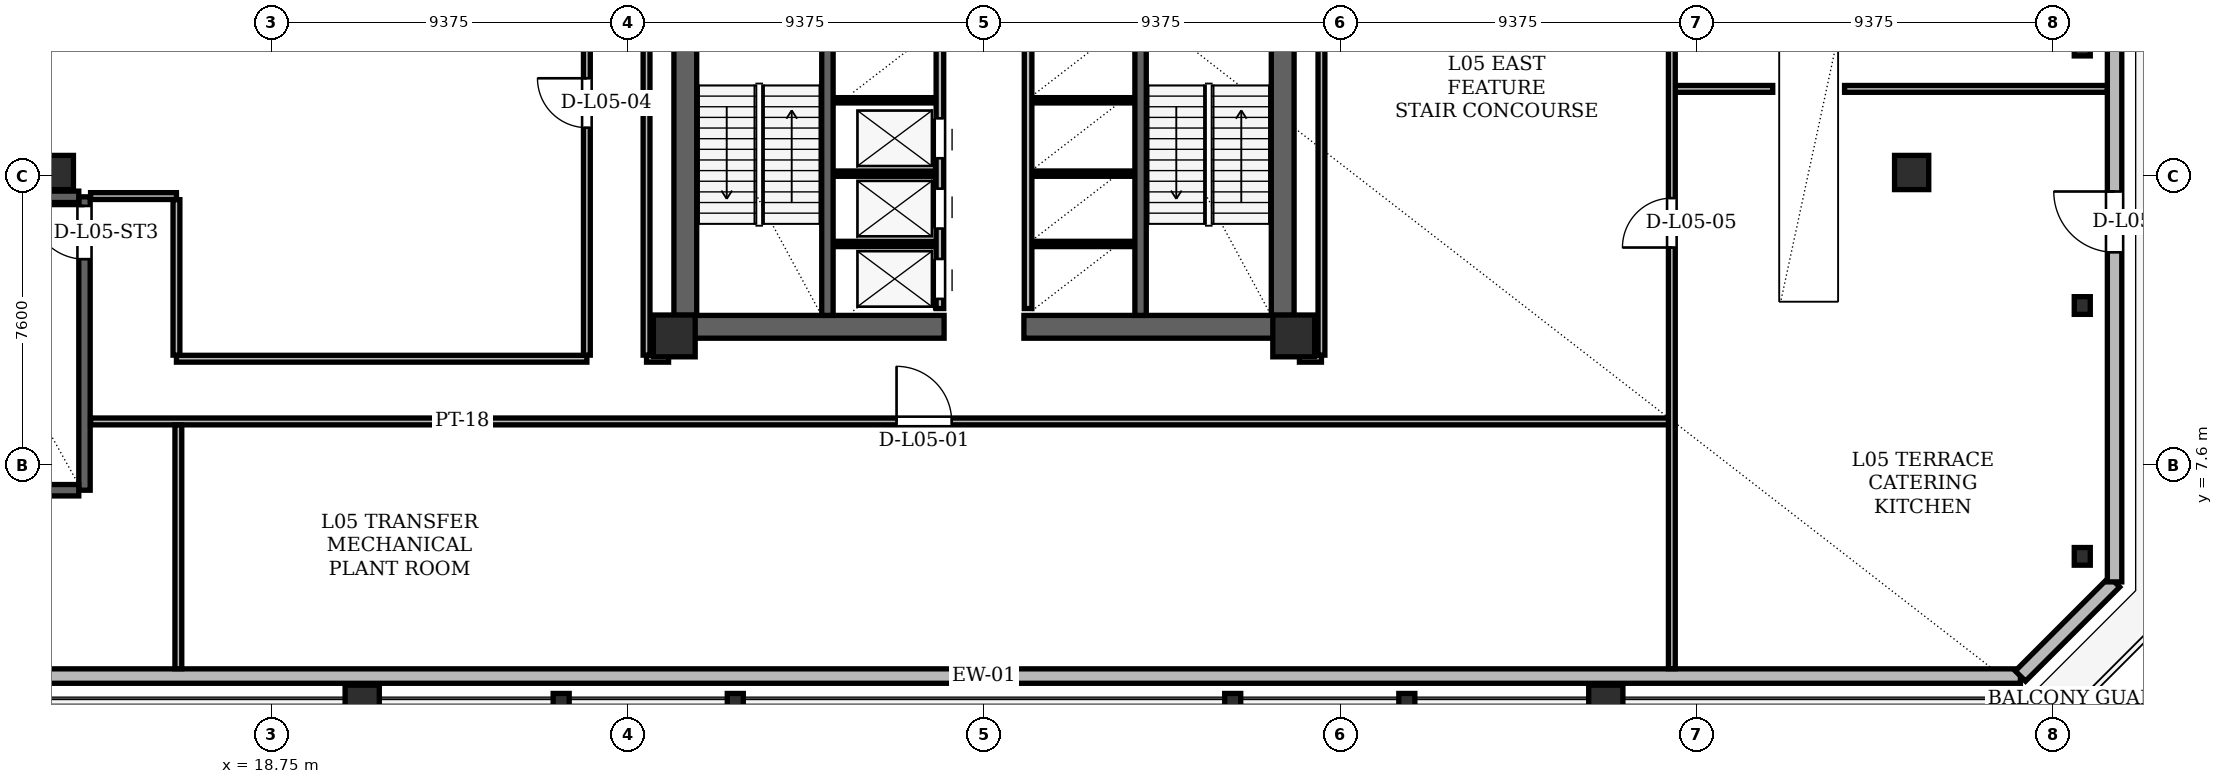
"""IFC4 building model, lengths in metres.
Left out: names, types, materials, properties, quantities, classifications, styles, units other than length and angle.
Written with IfcOpenShell. Run it as: python <this file> out.ifc"""

import sys

from ifc_helpers import new_model, si_unit, direction, frame, frame_2d, origin, origin_2d, place, context, subcontext, project, spatial, rectangle, hollow_rectangle, i_section, extrude, element, fill, save


model = new_model("IFC4")
c1 = context("Model", 3, precision=1e-05, world=origin(), true_north=direction((0.0, 1.0)))
c2 = subcontext(c1, "Body", "Model", "MODEL_VIEW")
j1 = project(units=[si_unit("LENGTHUNIT", "METRE"), si_unit("PLANEANGLEUNIT", "RADIAN")], contexts=[c1])
p1 = place(None, origin())
s1 = spatial("IfcSite", under=j1, at=p1, CompositionType="ELEMENT")
p2 = place(p1, origin())
s2 = spatial("IfcBuilding", under=s1, at=p2, CompositionType="ELEMENT")
p3 = place(p2, frame((0.0, 0.0, 22.5)))
s3 = spatial("IfcBuildingStorey", under=s2, at=p3, CompositionType="ELEMENT", Elevation=22.5)
for number, where, z_axis, x_axis in (
    (1, (29.35, 11.0, 0.0), (0.0, 0.0, 1.0), (1.0, 0.0, 0.0)),
    (2, (45.65, 11.0, 0.0), (0.0, 0.0, 1.0), (1.0, 0.0, 0.0)),
):
    element("IfcColumn", number, at=place(p3, frame(where, z_axis=z_axis, x_axis=x_axis)), inside=s3, PredefinedType="COLUMN", context=c2, shape_type="SweptSolid", body=[
        extrude(hollow_rectangle(XDim=1.1, YDim=1.1, WallThickness=0.09, at=origin_2d()), origin(), (0.0, 0.0, 1.0), 4.8),
    ])
for number, where, z_axis, x_axis in (
    (3, (13.09, 15.3, 0.004), (0.0, 0.0, 1.0), (1.0, 0.0, 0.0)),
    (4, (21.138, 1.36, 0.004), (0.0, 0.0, 1.0), (1.0, 0.0, 0.0)),
    (5, (53.862, 1.36, 0.004), (0.0, 0.0, 1.0), (1.0, 0.0, 0.0)),
    (6, (61.91, 15.3, 0.004), (0.0, 0.0, 1.0), (1.0, 0.0, 0.0)),
):
    element("IfcColumn", number, at=place(p3, frame(where, z_axis=z_axis, x_axis=x_axis)), inside=s3, PredefinedType="COLUMN", context=c2, shape_type="SweptSolid", body=[
        extrude(hollow_rectangle(XDim=0.9, YDim=0.9, WallThickness=0.075, at=origin_2d()), origin(), (0.0, 0.0, 1.0), 4.786),
    ])
for number, where, z_axis, x_axis in (
    (7, (26.374, 1.36, 0.004), (0.0, 0.0, 1.0), (1.0, 0.0, 0.0)),
    (8, (30.955, 1.36, 0.004), (0.0, 0.0, 1.0), (1.0, 0.0, 0.0)),
    (9, (44.045, 1.36, 0.004), (0.0, 0.0, 1.0), (1.0, 0.0, 0.0)),
    (10, (48.626, 1.36, 0.004), (0.0, 0.0, 1.0), (1.0, 0.0, 0.0)),
):
    element("IfcColumn", number, at=place(p3, frame(where, z_axis=z_axis, x_axis=x_axis)), inside=s3, PredefinedType="COLUMN", context=c2, shape_type="SweptSolid", body=[
        extrude(i_section(OverallWidth=0.422, OverallDepth=0.465, WebThickness=0.045, FlangeThickness=0.072, at=origin_2d()), origin(), (0.0, 0.0, 1.0), 4.791),
    ])
for number, where, z_axis, x_axis in (
    (11, (66.4, 5.2, 0.0), (0.0, 0.0, 1.0), (1.0, 0.0, 0.0)),
    (12, (66.4, 11.8, 0.0), (0.0, 0.0, 1.0), (1.0, 0.0, 0.0)),
    (13, (66.4, 18.6, 0.0), (0.0, 0.0, 1.0), (1.0, 0.0, 0.0)),
):
    element("IfcColumn", number, at=place(p3, frame(where, z_axis=z_axis, x_axis=x_axis)), inside=s3, PredefinedType="COLUMN", context=c2, shape_type="SweptSolid", body=[
        extrude(i_section(OverallWidth=0.422, OverallDepth=0.465, WebThickness=0.045, FlangeThickness=0.072, at=origin_2d()), origin(), (0.0, 0.0, 1.0), 4.8),
    ])
for number, where, z_axis, x_axis in (
    (14, (29.64, 11.0, 0.0), (0.0, 0.0, 1.0), (0.0, 1.0, 0.0)),
    (15, (45.36, 11.0, 0.0), (0.0, 0.0, 1.0), (0.0, 1.0, 0.0)),
):
    element("IfcWall", number, at=place(p3, frame(where, z_axis=z_axis, x_axis=x_axis)), inside=s3, PredefinedType="SHEAR", context=c2, shape_type="SweptSolid", body=[
        extrude(rectangle(XDim=13.3, YDim=0.6, at=frame_2d((6.65, 0.0))), origin(), (0.0, 0.0, 1.0), 4.56),
    ])
for number, where, z_axis, x_axis in (
    (16, (29.35, 11.24, 0.0), (0.0, 0.0, 1.0), (1.0, 0.0, 0.0)),
    (17, (38.55, 11.24, 0.0), (0.0, 0.0, 1.0), (1.0, 0.0, 0.0)),
):
    element("IfcWall", number, at=place(p3, frame(where, z_axis=z_axis, x_axis=x_axis)), inside=s3, PredefinedType="SHEAR", context=c2, shape_type="SweptSolid", body=[
        extrude(rectangle(XDim=7.1, YDim=0.6, at=frame_2d((3.55, 0.0))), origin(), (0.0, 0.0, 1.0), 4.56),
    ])
for number, where, z_axis, x_axis in (
    (18, (33.38, 11.54, 0.0), (0.0, 0.0, 1.0), (0.0, 1.0, 0.0)),
    (19, (41.62, 11.54, 0.0), (0.0, 0.0, 1.0), (0.0, 1.0, 0.0)),
):
    element("IfcWall", number, at=place(p3, frame(where, z_axis=z_axis, x_axis=x_axis)), inside=s3, PredefinedType="SHEAR", context=c2, shape_type="SweptSolid", body=[
        extrude(rectangle(XDim=7.62, YDim=0.3, at=frame_2d((3.81, 0.0))), origin(), (0.0, 0.0, 1.0), 4.56),
    ])
p4 = place(p3, frame((13.83, 6.94, 0.0), z_axis=(0.0, 0.0, 1.0), x_axis=(0.0, 1.0, 0.0)))
e20 = element("IfcWall", 20, at=p4, inside=s3, PredefinedType="SHEAR", context=c2, shape_type="SweptSolid", body=[
    extrude(rectangle(XDim=7.72, YDim=0.3, at=frame_2d((3.86, 0.0))), origin(), (0.0, 0.0, 1.0), 4.56),
])
p5 = place(p4, frame((6.08, 0.0, 0.0)))
e21 = element("IfcOpeningElement", 21, at=p5, cuts=e20, PredefinedType="OPENING", context=c2, shape_type="SweptSolid", body=[
    extrude(rectangle(XDim=1.4, YDim=2.2, at=frame_2d((0.7, 1.1))), frame((0.0, 0.15, 0.0), z_axis=(0.0, -1.0, 0.0), x_axis=(1.0, 0.0, 0.0)), (0.0, 0.0, 1.0), 0.3),
])
for number, where, z_axis, x_axis in (
    (22, (10.39, 6.94, 0.0), (0.0, 0.0, 1.0), (1.0, 0.0, 0.0)),
    (23, (10.39, 14.66, 0.0), (0.0, 0.0, 1.0), (1.0, 0.0, 0.0)),
):
    element("IfcWall", number, at=place(p3, frame(where, z_axis=z_axis, x_axis=x_axis)), inside=s3, PredefinedType="SHEAR", context=c2, shape_type="SweptSolid", body=[
        extrude(rectangle(XDim=3.29, YDim=0.3, at=frame_2d((1.645, 0.0))), origin(), (0.0, 0.0, 1.0), 4.56),
    ])
p6 = place(p3, frame((10.228, 2.05, 0.0), z_axis=(0.0, 0.0, 1.0), x_axis=(1.0, 0.0, 0.0)))
e24 = element("IfcWall", 24, at=p6, inside=s3, PredefinedType="SOLIDWALL", context=c2, shape_type="SweptSolid", body=[
    extrude(rectangle(XDim=54.544, YDim=0.38, at=frame_2d((27.272, 0.0))), origin(), (0.0, 0.0, 1.0), 3.35),
])
p7 = place(p3, frame((64.772, 2.05, 0.0), z_axis=(0.0, 0.0, 1.0), x_axis=(0.707106781187, 0.707106781187, 0.0)))
e25 = element("IfcWall", 25, at=p7, inside=s3, PredefinedType="SOLIDWALL", context=c2, shape_type="SweptSolid", body=[
    extrude(rectangle(XDim=3.504, YDim=0.38, at=frame_2d((1.752, 0.0))), origin(), (0.0, 0.0, 1.0), 4.56),
])
p8 = place(p3, frame((67.25, 4.528, 0.0), z_axis=(0.0, 0.0, 1.0), x_axis=(0.0, 1.0, 0.0)))
e26 = element("IfcWall", 26, at=p8, inside=s3, PredefinedType="SOLIDWALL", context=c2, shape_type="SweptSolid", body=[
    extrude(rectangle(XDim=36.544, YDim=0.38, at=frame_2d((18.272, 0.0))), origin(), (0.0, 0.0, 1.0), 4.56),
])
p9 = place(p8, frame((8.672, 0.0, 0.0)))
e27 = element("IfcOpeningElement", 27, at=p9, cuts=e26, PredefinedType="OPENING", context=c2, shape_type="SweptSolid", body=[
    extrude(rectangle(XDim=1.6, YDim=2.2, at=frame_2d((0.8, 1.1))), frame((0.0, 0.19, 0.0), z_axis=(0.0, -1.0, 0.0), x_axis=(1.0, 0.0, 0.0)), (0.0, 0.0, 1.0), 0.38),
])
p10 = place(p3, frame((36.34, 11.72, 0.0), z_axis=(0.0, 0.0, 1.0), x_axis=(0.0, 1.0, 0.0)))
e28 = element("IfcWall", 28, at=p10, inside=s3, PredefinedType="PARTITIONING", context=c2, shape_type="SweptSolid", body=[
    extrude(rectangle(XDim=7.6, YDim=0.2, at=frame_2d((3.8, 0.0))), origin(), (0.0, 0.0, 1.0), 4.56),
])
p11 = place(p10, frame((0.255, 0.0, 0.0)))
e29 = element("IfcOpeningElement", 29, at=p11, cuts=e28, PredefinedType="OPENING", context=c2, shape_type="SweptSolid", body=[
    extrude(rectangle(XDim=1.05, YDim=2.15, at=frame_2d((0.525, 1.075))), frame((0.0, 0.1, 0.0), z_axis=(0.0, -1.0, 0.0), x_axis=(1.0, 0.0, 0.0)), (0.0, 0.0, 1.0), 0.2),
])
p12 = place(p10, frame((2.105, 0.0, 0.0)))
e30 = element("IfcOpeningElement", 30, at=p12, cuts=e28, PredefinedType="OPENING", context=c2, shape_type="SweptSolid", body=[
    extrude(rectangle(XDim=1.05, YDim=2.15, at=frame_2d((0.525, 1.075))), frame((0.0, 0.1, 0.0), z_axis=(0.0, -1.0, 0.0), x_axis=(1.0, 0.0, 0.0)), (0.0, 0.0, 1.0), 0.2),
])
p13 = place(p10, frame((3.955, 0.0, 0.0)))
e31 = element("IfcOpeningElement", 31, at=p13, cuts=e28, PredefinedType="OPENING", context=c2, shape_type="SweptSolid", body=[
    extrude(rectangle(XDim=1.05, YDim=2.15, at=frame_2d((0.525, 1.075))), frame((0.0, 0.1, 0.0), z_axis=(0.0, -1.0, 0.0), x_axis=(1.0, 0.0, 0.0)), (0.0, 0.0, 1.0), 0.2),
])
for number, where, z_axis, x_axis in (
    (32, (33.56, 13.42, 0.0), (0.0, 0.0, 1.0), (1.0, 0.0, 0.0)),
    (33, (33.56, 15.27, 0.0), (0.0, 0.0, 1.0), (1.0, 0.0, 0.0)),
    (34, (33.56, 17.2, 0.0), (0.0, 0.0, 1.0), (1.0, 0.0, 0.0)),
):
    element("IfcWall", number, at=place(p3, frame(where, z_axis=z_axis, x_axis=x_axis)), inside=s3, PredefinedType="PARTITIONING", context=c2, shape_type="SweptSolid", body=[
        extrude(rectangle(XDim=2.66, YDim=0.14, at=frame_2d((1.33, 0.0))), origin(), (0.0, 0.0, 1.0), 4.56),
    ])
p14 = place(p3, frame((38.66, 11.72, 0.0), z_axis=(0.0, 0.0, 1.0), x_axis=(0.0, 1.0, 0.0)))
e35 = element("IfcWall", 35, at=p14, inside=s3, PredefinedType="PARTITIONING", context=c2, shape_type="SweptSolid", body=[
    extrude(rectangle(XDim=9.1, YDim=0.2, at=frame_2d((4.55, 0.0))), origin(), (0.0, 0.0, 1.0), 4.56),
])
for number, where, z_axis, x_axis in (
    (36, (38.78, 13.42, 0.0), (0.0, 0.0, 1.0), (1.0, 0.0, 0.0)),
    (37, (38.78, 15.27, 0.0), (0.0, 0.0, 1.0), (1.0, 0.0, 0.0)),
    (38, (38.78, 17.2, 0.0), (0.0, 0.0, 1.0), (1.0, 0.0, 0.0)),
):
    element("IfcWall", number, at=place(p3, frame(where, z_axis=z_axis, x_axis=x_axis)), inside=s3, PredefinedType="PARTITIONING", context=c2, shape_type="SweptSolid", body=[
        extrude(rectangle(XDim=2.66, YDim=0.14, at=frame_2d((1.33, 0.0))), origin(), (0.0, 0.0, 1.0), 4.56),
    ])
p15 = place(p3, frame((13.99, 8.75, 0.0), z_axis=(0.0, 0.0, 1.0), x_axis=(1.0, 0.0, 0.0)))
e39 = element("IfcWall", 39, at=p15, inside=s3, PredefinedType="PARTITIONING", context=c2, shape_type="SweptSolid", body=[
    extrude(rectangle(XDim=41.61, YDim=0.18, at=frame_2d((20.805, 0.0))), origin(), (0.0, 0.0, 1.0), 3.35),
])
p16 = place(p15, frame((21.209, 0.0, 0.0)))
e40 = element("IfcOpeningElement", 40, at=p16, cuts=e39, PredefinedType="OPENING", context=c2, shape_type="SweptSolid", body=[
    extrude(rectangle(XDim=1.45, YDim=2.25, at=frame_2d((0.725, 1.125))), frame((0.0, 0.09, 0.0), z_axis=(0.0, -1.0, 0.0), x_axis=(1.0, 0.0, 0.0)), (0.0, 0.0, 1.0), 0.18),
])
p17 = place(p3, frame((16.25, 10.4, 0.0), z_axis=(0.0, 0.0, 1.0), x_axis=(1.0, 0.0, 0.0)))
e41 = element("IfcWall", 41, at=p17, inside=s3, PredefinedType="PARTITIONING", context=c2, shape_type="SweptSolid", body=[
    extrude(rectangle(XDim=10.8, YDim=0.18, at=frame_2d((5.4, 0.0))), origin(), (0.0, 0.0, 1.0), 4.56),
])
for number, where, z_axis, x_axis in (
    (42, (28.62, 10.4, 0.0), (0.0, 0.0, 1.0), (1.0, 0.0, 0.0)),
    (43, (45.8, 10.4, 0.0), (0.0, 0.0, 1.0), (1.0, 0.0, 0.0)),
):
    element("IfcWall", number, at=place(p3, frame(where, z_axis=z_axis, x_axis=x_axis)), inside=s3, PredefinedType="PARTITIONING", context=c2, shape_type="SweptSolid", body=[
        extrude(rectangle(XDim=0.58, YDim=0.18, at=frame_2d((0.29, 0.0))), origin(), (0.0, 0.0, 1.0), 3.623),
    ])
p18 = place(p3, frame((13.99, 14.68, 0.0), z_axis=(0.0, 0.0, 1.0), x_axis=(1.0, 0.0, 0.0)))
e44 = element("IfcWall", 44, at=p18, inside=s3, PredefinedType="PARTITIONING", context=c2, shape_type="SweptSolid", body=[
    extrude(rectangle(XDim=2.26, YDim=0.18, at=frame_2d((1.13, 0.0))), origin(), (0.0, 0.0, 1.0), 3.623),
])
p19 = place(p3, frame((55.6, 17.5, 0.0), z_axis=(0.0, 0.0, 1.0), x_axis=(1.0, 0.0, 0.0)))
e45 = element("IfcWall", 45, at=p19, inside=s3, PredefinedType="PARTITIONING", context=c2, shape_type="SweptSolid", body=[
    extrude(rectangle(XDim=2.655, YDim=0.18, at=frame_2d((1.327, 0.0))), origin(), (0.0, 0.0, 1.0), 4.56),
])
p20 = place(p3, frame((60.145, 17.5, 0.0), z_axis=(0.0, 0.0, 1.0), x_axis=(1.0, 0.0, 0.0)))
e46 = element("IfcWall", 46, at=p20, inside=s3, PredefinedType="PARTITIONING", context=c2, shape_type="SweptSolid", body=[
    extrude(rectangle(XDim=6.911, YDim=0.18, at=frame_2d((3.456, 0.0))), origin(), (0.0, 0.0, 1.0), 3.35),
])
p21 = place(p3, frame((16.25, 10.494, 0.0), z_axis=(0.0, 0.0, 1.0), x_axis=(0.0, 1.0, 0.0)))
e47 = element("IfcWall", 47, at=p21, inside=s3, PredefinedType="PARTITIONING", context=c2, shape_type="SweptSolid", body=[
    extrude(rectangle(XDim=4.092, YDim=0.18, at=frame_2d((2.046, 0.0))), origin(), (0.0, 0.0, 1.0), 3.35),
])
p22 = place(p3, frame((16.3, 2.244, 0.0), z_axis=(0.0, 0.0, 1.0), x_axis=(0.0, 1.0, 0.0)))
e48 = element("IfcWall", 48, at=p22, inside=s3, PredefinedType="PARTITIONING", context=c2, shape_type="SweptSolid", body=[
    extrude(rectangle(XDim=6.412, YDim=0.18, at=frame_2d((3.206, 0.0))), origin(), (0.0, 0.0, 1.0), 4.56),
])
p23 = place(p3, frame((27.05, 10.494, 0.0), z_axis=(0.0, 0.0, 1.0), x_axis=(0.0, 1.0, 0.0)))
e49 = element("IfcWall", 49, at=p23, inside=s3, PredefinedType="PARTITIONING", context=c2, shape_type="SweptSolid", body=[
    extrude(rectangle(XDim=28.386, YDim=0.18, at=frame_2d((14.193, 0.0))), origin(), (0.0, 0.0, 1.0), 3.35),
])
p24 = place(p23, frame((5.985, 0.0, 0.0)))
e50 = element("IfcOpeningElement", 50, at=p24, cuts=e49, PredefinedType="OPENING", context=c2, shape_type="SweptSolid", body=[
    extrude(rectangle(XDim=1.3, YDim=2.2, at=frame_2d((0.65, 1.1))), frame((0.0, 0.09, 0.0), z_axis=(0.0, -1.0, 0.0), x_axis=(1.0, 0.0, 0.0)), (0.0, 0.0, 1.0), 0.18),
])
p25 = place(p3, frame((28.62, 10.494, 0.0), z_axis=(0.0, 0.0, 1.0), x_axis=(0.0, 1.0, 0.0)))
e51 = element("IfcWall", 51, at=p25, inside=s3, PredefinedType="PARTITIONING", context=c2, shape_type="SweptSolid", body=[
    extrude(rectangle(XDim=14.162, YDim=0.18, at=frame_2d((7.081, 0.0))), origin(), (0.0, 0.0, 1.0), 3.623),
])
p26 = place(p3, frame((46.38, 10.494, 0.0), z_axis=(0.0, 0.0, 1.0), x_axis=(0.0, 1.0, 0.0)))
e52 = element("IfcWall", 52, at=p26, inside=s3, PredefinedType="PARTITIONING", context=c2, shape_type="SweptSolid", body=[
    extrude(rectangle(XDim=14.162, YDim=0.18, at=frame_2d((7.081, 0.0))), origin(), (0.0, 0.0, 1.0), 4.56),
])
p27 = place(p3, frame((55.6, 2.244, 0.0), z_axis=(0.0, 0.0, 1.0), x_axis=(0.0, 1.0, 0.0)))
e53 = element("IfcWall", 53, at=p27, inside=s3, PredefinedType="PARTITIONING", context=c2, shape_type="SweptSolid", body=[
    extrude(rectangle(XDim=41.112, YDim=0.18, at=frame_2d((20.556, 0.0))), origin(), (0.0, 0.0, 1.0), 3.35),
])
p28 = place(p27, frame((11.082, 0.0, 0.0)))
e54 = element("IfcOpeningElement", 54, at=p28, cuts=e53, PredefinedType="OPENING", context=c2, shape_type="SweptSolid", body=[
    extrude(rectangle(XDim=1.3, YDim=2.2, at=frame_2d((0.65, 1.1))), frame((0.0, 0.09, 0.0), z_axis=(0.0, -1.0, 0.0), x_axis=(1.0, 0.0, 0.0)), (0.0, 0.0, 1.0), 0.18),
])
p29 = place(p27, frame((18.132, 0.0, 0.0)))
e55 = element("IfcOpeningElement", 55, at=p29, cuts=e53, PredefinedType="OPENING", context=c2, shape_type="SweptSolid", body=[
    extrude(rectangle(XDim=1.3, YDim=2.2, at=frame_2d((0.65, 1.1))), frame((0.0, 0.09, 0.0), z_axis=(0.0, -1.0, 0.0), x_axis=(1.0, 0.0, 0.0)), (0.0, 0.0, 1.0), 0.18),
])
p30 = place(p9, origin())
e56 = element("IfcDoor", 56, at=p30, inside=s3, OperationType="SINGLE_SWING_RIGHT", PredefinedType="DOOR", context=c2, shape_type="SweptSolid", body=[
    extrude(rectangle(XDim=1.6, YDim=2.2, at=frame_2d((0.8, 1.1))), frame((0.0, 0.025, 0.0), z_axis=(0.0, -1.0, 0.0), x_axis=(1.0, 0.0, 0.0)), (0.0, 0.0, 1.0), 0.05),
])
fill(e27, e56)
p31 = place(p11, origin())
e57 = element("IfcDoor", 57, at=p31, inside=s3, OperationType="SLIDING_TO_LEFT", PredefinedType="DOOR", context=c2, shape_type="SweptSolid", body=[
    extrude(rectangle(XDim=1.05, YDim=2.15, at=frame_2d((0.525, 1.075))), frame((0.0, 0.025, 0.0), z_axis=(0.0, -1.0, 0.0), x_axis=(1.0, 0.0, 0.0)), (0.0, 0.0, 1.0), 0.05),
])
fill(e29, e57)
p32 = place(p12, origin())
e58 = element("IfcDoor", 58, at=p32, inside=s3, OperationType="SLIDING_TO_RIGHT", PredefinedType="DOOR", context=c2, shape_type="SweptSolid", body=[
    extrude(rectangle(XDim=1.05, YDim=2.15, at=frame_2d((0.525, 1.075))), frame((0.0, 0.025, 0.0), z_axis=(0.0, -1.0, 0.0), x_axis=(1.0, 0.0, 0.0)), (0.0, 0.0, 1.0), 0.05),
])
fill(e30, e58)
p33 = place(p13, origin())
e59 = element("IfcDoor", 59, at=p33, inside=s3, OperationType="SLIDING_TO_LEFT", PredefinedType="DOOR", context=c2, shape_type="SweptSolid", body=[
    extrude(rectangle(XDim=1.05, YDim=2.15, at=frame_2d((0.525, 1.075))), frame((0.0, 0.025, 0.0), z_axis=(0.0, -1.0, 0.0), x_axis=(1.0, 0.0, 0.0)), (0.0, 0.0, 1.0), 0.05),
])
fill(e31, e59)
p34 = place(p5, origin())
e60 = element("IfcDoor", 60, at=p34, inside=s3, OperationType="SINGLE_SWING_RIGHT", PredefinedType="DOOR", context=c2, shape_type="SweptSolid", body=[
    extrude(rectangle(XDim=1.4, YDim=2.2, at=frame_2d((0.7, 1.1))), frame((0.0, 0.025, 0.0), z_axis=(0.0, -1.0, 0.0), x_axis=(1.0, 0.0, 0.0)), (0.0, 0.0, 1.0), 0.05),
])
fill(e21, e60)
p35 = place(p16, origin())
e61 = element("IfcDoor", 61, at=p35, inside=s3, OperationType="SINGLE_SWING_LEFT", PredefinedType="DOOR", context=c2, shape_type="SweptSolid", body=[
    extrude(rectangle(XDim=1.45, YDim=2.25, at=frame_2d((0.725, 1.125))), frame((0.0, 0.025, 0.0), z_axis=(0.0, -1.0, 0.0), x_axis=(1.0, 0.0, 0.0)), (0.0, 0.0, 1.0), 0.05),
])
fill(e40, e61)
p36 = place(p24, origin())
e62 = element("IfcDoor", 62, at=p36, inside=s3, OperationType="SINGLE_SWING_RIGHT", PredefinedType="DOOR", context=c2, shape_type="SweptSolid", body=[
    extrude(rectangle(XDim=1.3, YDim=2.2, at=frame_2d((0.65, 1.1))), frame((0.0, 0.025, 0.0), z_axis=(0.0, -1.0, 0.0), x_axis=(1.0, 0.0, 0.0)), (0.0, 0.0, 1.0), 0.05),
])
fill(e50, e62)
p37 = place(p28, origin())
e63 = element("IfcDoor", 63, at=p37, inside=s3, OperationType="SINGLE_SWING_LEFT", PredefinedType="DOOR", context=c2, shape_type="SweptSolid", body=[
    extrude(rectangle(XDim=1.3, YDim=2.2, at=frame_2d((0.65, 1.1))), frame((0.0, 0.025, 0.0), z_axis=(0.0, -1.0, 0.0), x_axis=(1.0, 0.0, 0.0)), (0.0, 0.0, 1.0), 0.05),
])
fill(e54, e63)
save(model, sys.argv[1])
